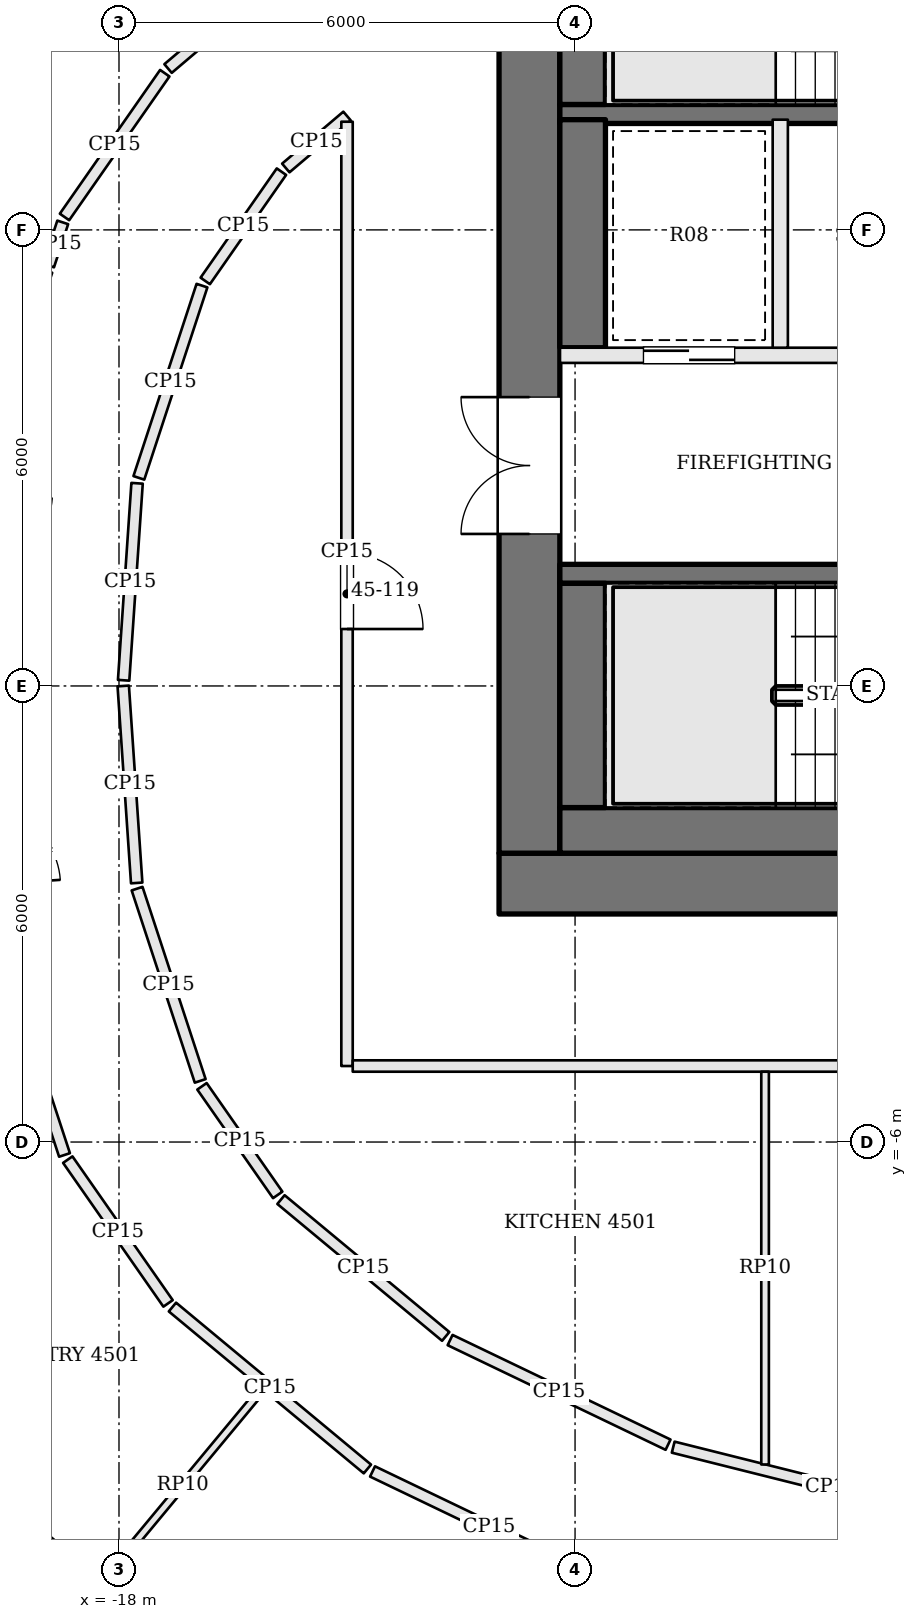
"""IFC4 building model, lengths in metres.
Left out: names, types, materials, properties, quantities, classifications, styles, units other than length and angle.
Written with IfcOpenShell. Run it as: python <this file> out.ifc"""

import sys

from ifc_helpers import new_model, si_unit, direction, frame, frame_2d, origin, place, context, subcontext, project, spatial, rectangle, extrude, element, fill, save


model = new_model("IFC4")
c1 = context("Model", 3, precision=1e-05, world=origin(), true_north=direction((0.0, 1.0)))
c2 = subcontext(c1, "Body", "Model", "MODEL_VIEW")
j1 = project(units=[si_unit("LENGTHUNIT", "METRE"), si_unit("PLANEANGLEUNIT", "RADIAN")], contexts=[c1])
p1 = place(None, origin())
s1 = spatial("IfcSite", under=j1, at=p1, CompositionType="ELEMENT")
p2 = place(p1, origin())
s2 = spatial("IfcBuilding", under=s1, at=p2, CompositionType="ELEMENT")
p3 = place(p2, frame((0.0, 0.0, 185.7)))
s3 = spatial("IfcBuildingStorey", under=s2, at=p3, CompositionType="ELEMENT", Elevation=185.7)
p4 = place(p3, frame((-13.0, -2.6, 0.0), z_axis=(0.0, 0.0, 1.0), x_axis=(1.0, 0.0, 0.0)))
e1 = element("IfcWall", 1, at=p4, inside=s3, PredefinedType="SHEAR", context=c2, shape_type="SweptSolid", body=[
    extrude(rectangle(XDim=26.0, YDim=0.8, at=frame_2d((13.0, 0.0))), origin(), (0.0, 0.0, 1.0), 3.9),
])
p5 = place(p4, frame((9.2, 0.0, 0.0)))
e2 = element("IfcOpeningElement", 2, at=p5, cuts=e1, PredefinedType="OPENING", context=c2, shape_type="SweptSolid", body=[
    extrude(rectangle(XDim=0.9, YDim=2.1, at=frame_2d((0.45, 1.05))), frame((0.0, 0.41, 0.0), z_axis=(0.0, -1.0, 0.0), x_axis=(1.0, 0.0, 0.0)), (0.0, 0.0, 1.0), 0.82),
])
p6 = place(p4, frame((12.3, 0.0, 0.0)))
e3 = element("IfcOpeningElement", 3, at=p6, cuts=e1, PredefinedType="OPENING", context=c2, shape_type="SweptSolid", body=[
    extrude(rectangle(XDim=0.9, YDim=2.1, at=frame_2d((0.45, 1.05))), frame((0.0, 0.41, 0.0), z_axis=(0.0, -1.0, 0.0), x_axis=(1.0, 0.0, 0.0)), (0.0, 0.0, 1.0), 0.82),
])
p7 = place(p4, frame((14.7, 0.0, 0.0)))
e4 = element("IfcOpeningElement", 4, at=p7, cuts=e1, PredefinedType="OPENING", context=c2, shape_type="SweptSolid", body=[
    extrude(rectangle(XDim=1.0, YDim=2.1, at=frame_2d((0.5, 1.05))), frame((0.0, 0.41, 0.0), z_axis=(0.0, -1.0, 0.0), x_axis=(1.0, 0.0, 0.0)), (0.0, 0.0, 1.0), 0.82),
])
p8 = place(p4, frame((16.55, 0.0, 0.0)))
e5 = element("IfcOpeningElement", 5, at=p8, cuts=e1, PredefinedType="OPENING", context=c2, shape_type="SweptSolid", body=[
    extrude(rectangle(XDim=0.9, YDim=2.1, at=frame_2d((0.45, 1.05))), frame((0.0, 0.41, 0.0), z_axis=(0.0, -1.0, 0.0), x_axis=(1.0, 0.0, 0.0)), (0.0, 0.0, 1.0), 0.82),
])
p9 = place(p3, frame((-12.6, -2.2, 0.0), z_axis=(0.0, 0.0, 1.0), x_axis=(0.0, 1.0, 0.0)))
e6 = element("IfcWall", 6, at=p9, inside=s3, PredefinedType="SHEAR", context=c2, shape_type="SweptSolid", body=[
    extrude(rectangle(XDim=13.4, YDim=0.8, at=frame_2d((6.7, 0.0))), origin(), (0.0, 0.0, 1.0), 3.9),
])
p10 = place(p9, frame((4.2, 0.0, 0.0)))
e7 = element("IfcOpeningElement", 7, at=p10, cuts=e6, PredefinedType="OPENING", context=c2, shape_type="SweptSolid", body=[
    extrude(rectangle(XDim=1.8, YDim=2.1, at=frame_2d((0.9, 1.05))), frame((0.0, 0.41, 0.0), z_axis=(0.0, -1.0, 0.0), x_axis=(1.0, 0.0, 0.0)), (0.0, 0.0, 1.0), 0.82),
])
p11 = place(p3, frame((-12.2, 1.475, 0.0), z_axis=(0.0, 0.0, 1.0), x_axis=(1.0, 0.0, 0.0)))
e8 = element("IfcWall", 8, at=p11, inside=s3, PredefinedType="SOLIDWALL", context=c2, shape_type="SweptSolid", body=[
    extrude(rectangle(XDim=7.1, YDim=0.25, at=frame_2d((3.55, 0.0))), origin(), (0.0, 0.0, 1.0), 3.7),
])
p12 = place(p11, frame((5.8, 0.0, 0.0)))
e9 = element("IfcOpeningElement", 9, at=p12, cuts=e8, PredefinedType="OPENING", context=c2, shape_type="SweptSolid", body=[
    extrude(rectangle(XDim=1.2, YDim=2.1, at=frame_2d((0.6, 1.05))), frame((0.0, 0.135, 0.0), z_axis=(0.0, -1.0, 0.0), x_axis=(1.0, 0.0, 0.0)), (0.0, 0.0, 1.0), 0.27),
])
p13 = place(p3, frame((-12.2, 4.35, 0.0), z_axis=(0.0, 0.0, 1.0), x_axis=(1.0, 0.0, 0.0)))
e10 = element("IfcWall", 10, at=p13, inside=s3, PredefinedType="SOLIDWALL", context=c2, shape_type="SweptSolid", body=[
    extrude(rectangle(XDim=7.1, YDim=0.2, at=frame_2d((3.55, 0.0))), origin(), (0.0, 0.0, 1.0), 3.7),
])
p14 = place(p13, frame((4.4, 0.0, 0.0)))
e11 = element("IfcOpeningElement", 11, at=p14, cuts=e10, PredefinedType="OPENING", context=c2, shape_type="SweptSolid", body=[
    extrude(rectangle(XDim=1.2, YDim=2.1, at=frame_2d((0.6, 1.05))), frame((0.0, 0.11, 0.0), z_axis=(0.0, -1.0, 0.0), x_axis=(1.0, 0.0, 0.0)), (0.0, 0.0, 1.0), 0.22),
])
p15 = place(p13, frame((1.1, 0.0, 0.0)))
e12 = element("IfcOpeningElement", 12, at=p15, cuts=e10, PredefinedType="OPENING", context=c2, shape_type="SweptSolid", body=[
    extrude(rectangle(XDim=1.2, YDim=2.1, at=frame_2d((0.6, 1.05))), frame((0.0, 0.11, 0.0), z_axis=(0.0, -1.0, 0.0), x_axis=(1.0, 0.0, 0.0)), (0.0, 0.0, 1.0), 0.22),
])
p16 = place(p3, frame((-12.2, 7.525, 0.0), z_axis=(0.0, 0.0, 1.0), x_axis=(1.0, 0.0, 0.0)))
e13 = element("IfcWall", 13, at=p16, inside=s3, PredefinedType="SOLIDWALL", context=c2, shape_type="SweptSolid", body=[
    extrude(rectangle(XDim=7.1, YDim=0.25, at=frame_2d((3.55, 0.0))), origin(), (0.0, 0.0, 1.0), 3.7),
])
p17 = place(p16, frame((5.8, 0.0, 0.0)))
e14 = element("IfcOpeningElement", 14, at=p17, cuts=e13, PredefinedType="OPENING", context=c2, shape_type="SweptSolid", body=[
    extrude(rectangle(XDim=1.2, YDim=2.1, at=frame_2d((0.6, 1.05))), frame((0.0, 0.135, 0.0), z_axis=(0.0, -1.0, 0.0), x_axis=(1.0, 0.0, 0.0)), (0.0, 0.0, 1.0), 0.27),
])
p18 = place(p3, frame((-9.3, 4.45, 0.0), z_axis=(0.0, 0.0, 1.0), x_axis=(0.0, 1.0, 0.0)))
e15 = element("IfcWall", 15, at=p18, inside=s3, PredefinedType="SOLIDWALL", context=c2, shape_type="SweptSolid", body=[
    extrude(rectangle(XDim=3.0, YDim=0.2, at=frame_2d((1.5, 0.0))), origin(), (0.0, 0.0, 1.0), 3.7),
])
p19 = place(p3, frame((-12.2, -1.9, 0.0), z_axis=(0.0, 0.0, 1.0), x_axis=(1.0, 0.0, 0.0)))
e16 = element("IfcWall", 16, at=p19, inside=s3, PredefinedType="SOLIDWALL", context=c2, shape_type="SweptSolid", body=[
    extrude(rectangle(XDim=7.1, YDim=0.6, at=frame_2d((3.55, 0.0))), origin(), (0.0, 0.0, 1.0), 3.7),
])
p20 = place(p3, frame((-11.9, -1.6, 0.0), z_axis=(0.0, 0.0, 1.0), x_axis=(0.0, 1.0, 0.0)))
e17 = element("IfcWall", 17, at=p20, inside=s3, PredefinedType="SOLIDWALL", context=c2, shape_type="SweptSolid", body=[
    extrude(rectangle(XDim=2.95, YDim=0.6, at=frame_2d((1.475, 0.0))), origin(), (0.0, 0.0, 1.0), 3.7),
])
p21 = place(p3, frame((-11.9, 4.45, 0.0), z_axis=(0.0, 0.0, 1.0), x_axis=(0.0, 1.0, 0.0)))
e18 = element("IfcWall", 18, at=p21, inside=s3, PredefinedType="SOLIDWALL", context=c2, shape_type="SweptSolid", body=[
    extrude(rectangle(XDim=3.0, YDim=0.6, at=frame_2d((1.5, 0.0))), origin(), (0.0, 0.0, 1.0), 3.7),
])
p22 = place(p3, frame((-11.9, 7.65, 0.0), z_axis=(0.0, 0.0, 1.0), x_axis=(0.0, 1.0, 0.0)))
e19 = element("IfcWall", 19, at=p22, inside=s3, PredefinedType="SOLIDWALL", context=c2, shape_type="SweptSolid", body=[
    extrude(rectangle(XDim=2.95, YDim=0.6, at=frame_2d((1.475, 0.0))), origin(), (0.0, 0.0, 1.0), 3.7),
])
p23 = place(p3, frame((-15.057, 10.073, 0.0), z_axis=(0.0, 0.0, 1.0), x_axis=(-0.762398905861, -0.647107339119, 0.0)))
e20 = element("IfcWall", 20, at=p23, inside=s3, PredefinedType="PARTITIONING", context=c2, shape_type="SweptSolid", body=[
    extrude(rectangle(XDim=3.013, YDim=0.15, at=frame_2d((1.507, 0.0))), origin(), (0.0, 0.0, 1.0), 3.084),
])
p24 = place(p3, frame((-17.397, 8.062, 0.0), z_axis=(0.0, 0.0, 1.0), x_axis=(-0.572118665737, -0.820170855563, 0.0)))
e21 = element("IfcWall", 21, at=p24, inside=s3, PredefinedType="PARTITIONING", context=c2, shape_type="SweptSolid", body=[
    extrude(rectangle(XDim=2.306, YDim=0.15, at=frame_2d((1.153, 0.0))), origin(), (0.0, 0.0, 1.0), 3.084),
])
p25 = place(p3, frame((-18.74, 6.099, 0.0), z_axis=(0.0, 0.0, 1.0), x_axis=(-0.311689742103, -0.950183932019, 0.0)))
e22 = element("IfcWall", 22, at=p25, inside=s3, PredefinedType="PARTITIONING", context=c2, shape_type="SweptSolid", body=[
    extrude(rectangle(XDim=0.598, YDim=0.15, at=frame_2d((0.299, 0.0))), origin(), (0.0, 0.0, 1.0), 3.084),
])
p26 = place(p3, frame((-19.717, -3.124, 0.0), z_axis=(0.0, 0.0, 1.0), x_axis=(0.31188427026, -0.950120098706, 0.0)))
e23 = element("IfcWall", 23, at=p26, inside=s3, PredefinedType="PARTITIONING", context=c2, shape_type="SweptSolid", body=[
    extrude(rectangle(XDim=3.206, YDim=0.15, at=frame_2d((1.603, 0.0))), origin(), (0.0, 0.0, 1.0), 3.084),
])
p27 = place(p3, frame((-18.674, -6.232, 0.0), z_axis=(0.0, 0.0, 1.0), x_axis=(0.572118665737, -0.820170855563, 0.0)))
e24 = element("IfcWall", 24, at=p27, inside=s3, PredefinedType="PARTITIONING", context=c2, shape_type="SweptSolid", body=[
    extrude(rectangle(XDim=2.306, YDim=0.15, at=frame_2d((1.153, 0.0))), origin(), (0.0, 0.0, 1.0), 3.084),
])
p28 = place(p3, frame((-17.297, -8.171, 0.0), z_axis=(0.0, 0.0, 1.0), x_axis=(0.769228575061, -0.638973707839, 0.0)))
e25 = element("IfcWall", 25, at=p28, inside=s3, PredefinedType="PARTITIONING", context=c2, shape_type="SweptSolid", body=[
    extrude(rectangle(XDim=3.334, YDim=0.15, at=frame_2d((1.667, 0.0))), origin(), (0.0, 0.0, 1.0), 3.084),
])
p29 = place(p3, frame((-14.664, -10.334, 0.0), z_axis=(0.0, 0.0, 1.0), x_axis=(0.901500664489, -0.43277771653, 0.0)))
e26 = element("IfcWall", 26, at=p29, inside=s3, PredefinedType="PARTITIONING", context=c2, shape_type="SweptSolid", body=[
    extrude(rectangle(XDim=3.403, YDim=0.15, at=frame_2d((1.701, 0.0))), origin(), (0.0, 0.0, 1.0), 3.084),
])
p30 = place(p3, frame((-6.553, -11.056, 0.0), z_axis=(0.0, 0.0, 1.0), x_axis=(-0.970004917182, 0.243085294995, 0.0)))
e27 = element("IfcWall", 27, at=p30, inside=s3, PredefinedType="PARTITIONING", context=c2, shape_type="SweptSolid", body=[
    extrude(rectangle(XDim=4.284, YDim=0.15, at=frame_2d((2.142, 0.0))), origin(), (0.0, 0.0, 1.0), 3.084),
])
p31 = place(p3, frame((-10.776, -9.982, 0.0), z_axis=(0.0, 0.0, 1.0), x_axis=(-0.901511079436, 0.432756020933, 0.0)))
e28 = element("IfcWall", 28, at=p31, inside=s3, PredefinedType="PARTITIONING", context=c2, shape_type="SweptSolid", body=[
    extrude(rectangle(XDim=3.181, YDim=0.15, at=frame_2d((1.59, 0.0))), origin(), (0.0, 0.0, 1.0), 3.084),
])
p32 = place(p3, frame((-13.702, -8.557, 0.0), z_axis=(0.0, 0.0, 1.0), x_axis=(-0.769221825067, 0.638981833733, 0.0)))
e29 = element("IfcWall", 29, at=p32, inside=s3, PredefinedType="PARTITIONING", context=c2, shape_type="SweptSolid", body=[
    extrude(rectangle(XDim=2.817, YDim=0.15, at=frame_2d((1.409, 0.0))), origin(), (0.0, 0.0, 1.0), 3.084),
])
p33 = place(p3, frame((-15.912, -6.696, 0.0), z_axis=(0.0, 0.0, 1.0), x_axis=(-0.572078533763, 0.820198848578, 0.0)))
e30 = element("IfcWall", 30, at=p33, inside=s3, PredefinedType="PARTITIONING", context=c2, shape_type="SweptSolid", body=[
    extrude(rectangle(XDim=1.742, YDim=0.15, at=frame_2d((0.871, 0.0))), origin(), (0.0, 0.0, 1.0), 3.084),
])
p34 = place(p3, frame((-16.932, -5.196, 0.0), z_axis=(0.0, 0.0, 1.0), x_axis=(-0.311904957484, 0.950113307715, 0.0)))
e31 = element("IfcWall", 31, at=p34, inside=s3, PredefinedType="PARTITIONING", context=c2, shape_type="SweptSolid", body=[
    extrude(rectangle(XDim=2.662, YDim=0.15, at=frame_2d((1.331, 0.0))), origin(), (0.0, 0.0, 1.0), 3.084),
])
p35 = place(p3, frame((-17.767, -2.592, 0.0), z_axis=(0.0, 0.0, 1.0), x_axis=(-0.068140828228, 0.997675712608, 0.0)))
e32 = element("IfcWall", 32, at=p35, inside=s3, PredefinedType="PARTITIONING", context=c2, shape_type="SweptSolid", body=[
    extrude(rectangle(XDim=2.598, YDim=0.15, at=frame_2d((1.299, 0.0))), origin(), (0.0, 0.0, 1.0), 3.084),
])
p36 = place(p3, frame((-17.939, 0.075, 0.0), z_axis=(0.0, 0.0, 1.0), x_axis=(0.068227980697, 0.997669756307, 0.0)))
e33 = element("IfcWall", 33, at=p36, inside=s3, PredefinedType="PARTITIONING", context=c2, shape_type="SweptSolid", body=[
    extrude(rectangle(XDim=2.598, YDim=0.15, at=frame_2d((1.299, 0.0))), origin(), (0.0, 0.0, 1.0), 3.084),
])
p37 = place(p3, frame((-17.739, 2.738, 0.0), z_axis=(0.0, 0.0, 1.0), x_axis=(0.311904957484, 0.950113307715, 0.0)))
e34 = element("IfcWall", 34, at=p37, inside=s3, PredefinedType="PARTITIONING", context=c2, shape_type="SweptSolid", body=[
    extrude(rectangle(XDim=2.662, YDim=0.15, at=frame_2d((1.331, 0.0))), origin(), (0.0, 0.0, 1.0), 3.084),
])
p38 = place(p3, frame((-16.865, 5.329, 0.0), z_axis=(0.0, 0.0, 1.0), x_axis=(0.572096615639, 0.820186236397, 0.0)))
e35 = element("IfcWall", 35, at=p38, inside=s3, PredefinedType="PARTITIONING", context=c2, shape_type="SweptSolid", body=[
    extrude(rectangle(XDim=1.753, YDim=0.15, at=frame_2d((0.876, 0.0))), origin(), (0.0, 0.0, 1.0), 3.084),
])
p39 = place(p3, frame((-15.805, 6.814, 0.0), z_axis=(0.0, 0.0, 1.0), x_axis=(0.762298381233, 0.647225755027, 0.0)))
e36 = element("IfcWall", 36, at=p39, inside=s3, PredefinedType="PARTITIONING", context=c2, shape_type="SweptSolid", body=[
    extrude(rectangle(XDim=1.057, YDim=0.15, at=frame_2d((0.528, 0.0))), origin(), (0.0, 0.0, 1.0), 3.084),
])
p40 = place(p3, frame((-15.0, 7.423, 0.0), z_axis=(0.0, 0.0, 1.0), x_axis=(0.0, -1.0, 0.0)))
e37 = element("IfcWall", 37, at=p40, inside=s3, PredefinedType="PARTITIONING", context=c2, shape_type="SweptSolid", body=[
    extrude(rectangle(XDim=12.423, YDim=0.15, at=frame_2d((6.211, 0.0))), origin(), (0.0, 0.0, 1.0), 3.084),
])
p41 = place(p40, frame((5.674, 0.0, 0.0)))
e38 = element("IfcOpeningElement", 38, at=p41, cuts=e37, PredefinedType="OPENING", context=c2, shape_type="SweptSolid", body=[
    extrude(rectangle(XDim=1.0, YDim=2.1, at=frame_2d((0.5, 1.05))), frame((0.0, 0.085, 0.0), z_axis=(0.0, -1.0, 0.0), x_axis=(1.0, 0.0, 0.0)), (0.0, 0.0, 1.0), 0.17),
])
p42 = place(p3, frame((-14.925, -5.0, 0.0), z_axis=(0.0, 0.0, 1.0), x_axis=(1.0, 0.0, 0.0)))
e39 = element("IfcWall", 39, at=p42, inside=s3, PredefinedType="PARTITIONING", context=c2, shape_type="SweptSolid", body=[
    extrude(rectangle(XDim=29.925, YDim=0.15, at=frame_2d((14.962, 0.0))), origin(), (0.0, 0.0, 1.0), 3.084),
])
p43 = place(p42, frame((14.025, 0.0, 0.0)))
e40 = element("IfcOpeningElement", 40, at=p43, cuts=e39, PredefinedType="OPENING", context=c2, shape_type="SweptSolid", body=[
    extrude(rectangle(XDim=1.8, YDim=2.1, at=frame_2d((0.9, 1.05))), frame((0.0, 0.085, 0.0), z_axis=(0.0, -1.0, 0.0), x_axis=(1.0, 0.0, 0.0)), (0.0, 0.0, 1.0), 0.17),
])
p44 = place(p3, frame((-16.62, -13.153, 0.0), z_axis=(0.0, 0.0, 1.0), x_axis=(-0.769221883728, 0.638981763115, 0.0)))
e41 = element("IfcWall", 41, at=p44, inside=s3, PredefinedType="PARTITIONING", context=c2, shape_type="SweptSolid", body=[
    extrude(rectangle(XDim=3.457, YDim=0.1, at=frame_2d((1.728, 0.0))), origin(), (0.0, 0.0, 1.0), 3.084),
])
p45 = place(p3, frame((-16.114, -9.251, 0.0), z_axis=(0.0, 0.0, 1.0), x_axis=(-0.6387387217, -0.769423709929, 0.0)))
e42 = element("IfcWall", 42, at=p45, inside=s3, PredefinedType="PARTITIONING", context=c2, shape_type="SweptSolid", body=[
    extrude(rectangle(XDim=3.275, YDim=0.1, at=frame_2d((1.637, 0.0))), origin(), (0.0, 0.0, 1.0), 3.084),
])
p46 = place(p3, frame((-9.5, -10.242, 0.0), z_axis=(0.0, 0.0, 1.0), x_axis=(0.0, 1.0, 0.0)))
e43 = element("IfcWall", 43, at=p46, inside=s3, PredefinedType="PARTITIONING", context=c2, shape_type="SweptSolid", body=[
    extrude(rectangle(XDim=5.167, YDim=0.1, at=frame_2d((2.583, 0.0))), origin(), (0.0, 0.0, 1.0), 3.084),
])
p47 = place(p10, origin())
e44 = element("IfcDoor", 44, at=p47, inside=s3, OperationType="DOUBLE_DOOR_SINGLE_SWING", PredefinedType="DOOR", context=c2, shape_type="SweptSolid", body=[
    extrude(rectangle(XDim=1.8, YDim=2.1, at=frame_2d((0.9, 1.05))), frame((0.0, 0.025, 0.0), z_axis=(0.0, -1.0, 0.0), x_axis=(1.0, 0.0, 0.0)), (0.0, 0.0, 1.0), 0.05),
])
fill(e7, e44)
p48 = place(p15, origin())
e45 = element("IfcDoor", 45, at=p48, inside=s3, OperationType="SLIDING_TO_RIGHT", PredefinedType="DOOR", context=c2, shape_type="SweptSolid", body=[
    extrude(rectangle(XDim=1.2, YDim=2.1, at=frame_2d((0.6, 1.05))), frame((0.0, 0.025, 0.0), z_axis=(0.0, -1.0, 0.0), x_axis=(1.0, 0.0, 0.0)), (0.0, 0.0, 1.0), 0.05),
])
fill(e12, e45)
p49 = place(p41, origin())
e46 = element("IfcDoor", 46, at=p49, inside=s3, OperationType="SINGLE_SWING_RIGHT", PredefinedType="DOOR", context=c2, shape_type="SweptSolid", body=[
    extrude(rectangle(XDim=1.0, YDim=2.1, at=frame_2d((0.5, 1.05))), frame((0.0, 0.025, 0.0), z_axis=(0.0, -1.0, 0.0), x_axis=(1.0, 0.0, 0.0)), (0.0, 0.0, 1.0), 0.05),
])
fill(e38, e46)
save(model, sys.argv[1])
